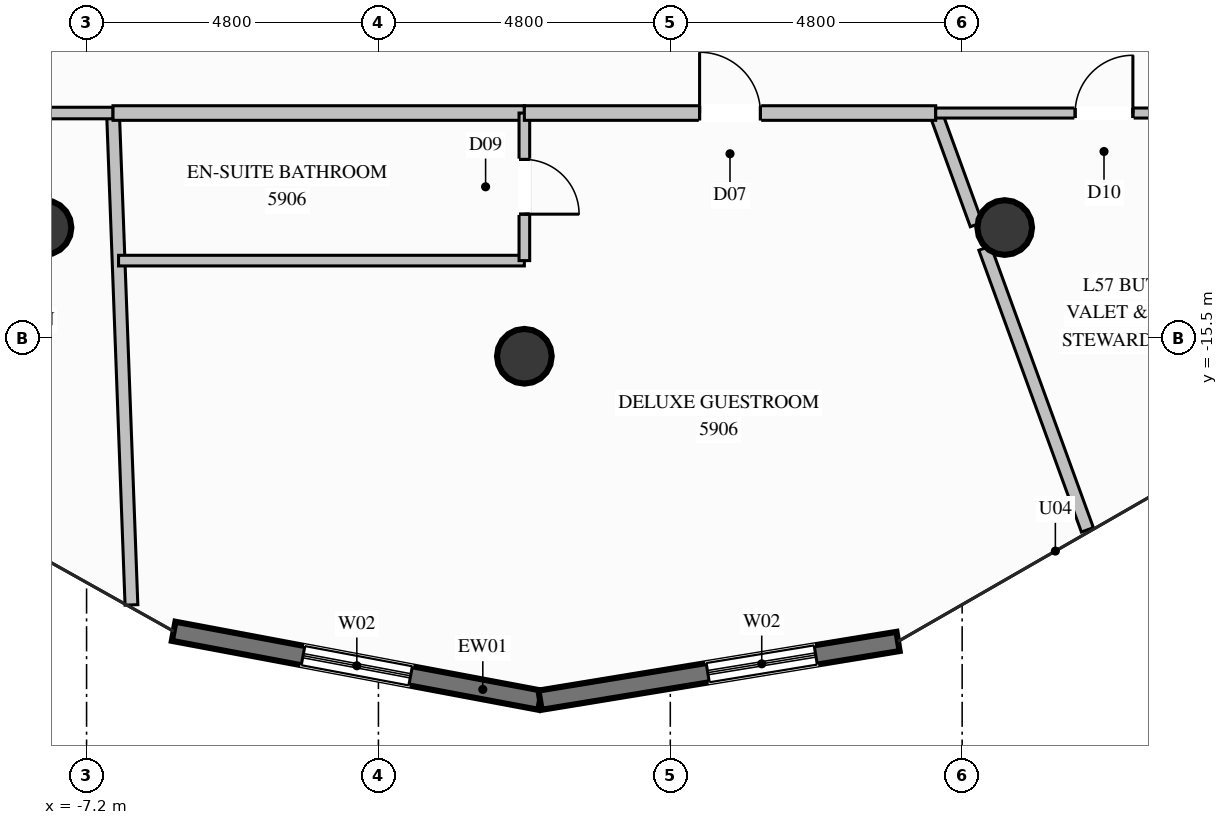
"""IFC4 building model, lengths in metres.
Left out: names, types, materials, properties, quantities, classifications, styles, units other than length and angle.
Written with IfcOpenShell. Run it as: python <this file> out.ifc"""

import sys

from ifc_helpers import new_model, si_unit, direction, frame, frame_2d, origin, origin_2d, place, context, subcontext, project, spatial, rectangle, circle, extrude, element, fill, save


model = new_model("IFC4")
c1 = context("Model", 3, precision=1e-05, world=origin(), true_north=direction((0.0, 1.0)))
c2 = subcontext(c1, "Body", "Model", "MODEL_VIEW")
j1 = project(units=[si_unit("LENGTHUNIT", "METRE"), si_unit("PLANEANGLEUNIT", "RADIAN")], contexts=[c1])
p1 = place(None, origin())
s1 = spatial("IfcSite", under=j1, at=p1, CompositionType="ELEMENT")
p2 = place(p1, origin())
s2 = spatial("IfcBuilding", under=s1, at=p2, CompositionType="ELEMENT")
p3 = place(p2, frame((0.0, 0.0, 220.0)))
s3 = spatial("IfcBuildingStorey", under=s2, at=p3, CompositionType="ELEMENT", Elevation=220.0)
for number, where, z_axis, x_axis in (
    (1, (-7.9, -13.683, 0.0), (0.0, 0.0, 1.0), (1.0, 0.0, 0.0)),
    (2, (0.0, -15.8, 0.0), (0.0, 0.0, 1.0), (1.0, 0.0, 0.0)),
    (3, (7.9, -13.683, 0.0), (0.0, 0.0, 1.0), (1.0, 0.0, 0.0)),
):
    element("IfcColumn", number, at=place(p3, frame(where, z_axis=z_axis, x_axis=x_axis)), inside=s3, PredefinedType="COLUMN", context=c2, shape_type="SweptSolid", body=[
        extrude(circle(Radius=0.45, at=origin_2d()), origin(), (0.0, 0.0, 1.0), 3.6),
    ])
p4 = place(p3, frame((0.258, -21.456, 0.0), z_axis=(0.0, 0.0, 1.0), x_axis=(-0.982778756256, 0.184786136523, 0.0)))
e4 = element("IfcWall", 4, at=p4, inside=s3, PredefinedType="SOLIDWALL", context=c2, shape_type="SweptSolid", body=[
    extrude(rectangle(XDim=6.132, YDim=0.32, at=frame_2d((3.066, 0.0))), origin(), (0.0, 0.0, 1.0), 3.36),
])
p5 = place(p4, frame((2.166, 0.0, 0.35)))
e5 = element("IfcOpeningElement", 5, at=p5, cuts=e4, PredefinedType="OPENING", context=c2, shape_type="SweptSolid", body=[
    extrude(rectangle(XDim=1.8, YDim=2.6, at=frame_2d((0.9, 1.3))), frame((0.0, 0.17, 0.0), z_axis=(0.0, -1.0, 0.0), x_axis=(1.0, 0.0, 0.0)), (0.0, 0.0, 1.0), 0.34),
])
p6 = place(p3, frame((6.146, -20.49, 0.0), z_axis=(0.0, 0.0, 1.0), x_axis=(-0.986805489114, -0.161910242585, 0.0)))
e6 = element("IfcWall", 6, at=p6, inside=s3, PredefinedType="SOLIDWALL", context=c2, shape_type="SweptSolid", body=[
    extrude(rectangle(XDim=5.967, YDim=0.32, at=frame_2d((2.983, 0.0))), origin(), (0.0, 0.0, 1.0), 3.36),
])
p7 = place(p6, frame((1.372, 0.0, 0.35)))
e7 = element("IfcOpeningElement", 7, at=p7, cuts=e6, PredefinedType="OPENING", context=c2, shape_type="SweptSolid", body=[
    extrude(rectangle(XDim=1.8, YDim=2.6, at=frame_2d((0.9, 1.3))), frame((0.0, 0.17, 0.0), z_axis=(0.0, -1.0, 0.0), x_axis=(1.0, 0.0, 0.0)), (0.0, 0.0, 1.0), 0.34),
])
p8 = place(p3, frame((-6.765, -11.8, 0.0), z_axis=(0.0, 0.0, 1.0), x_axis=(0.037429988299, -0.999299252464, 0.0)))
e8 = element("IfcWall", 8, at=p8, inside=s3, PredefinedType="PARTITIONING", context=c2, shape_type="SweptSolid", body=[
    extrude(rectangle(XDim=8.094, YDim=0.21, at=frame_2d((4.047, 0.0))), origin(), (0.0, 0.0, 1.0), 3.36),
])
p9 = place(p3, frame((-12.3, -11.8, 0.0), z_axis=(0.0, 0.0, 1.0), x_axis=(1.0, 0.0, 0.0)))
e9 = element("IfcWall", 9, at=p9, inside=s3, PredefinedType="PARTITIONING", context=c2, shape_type="SweptSolid", body=[
    extrude(rectangle(XDim=5.535, YDim=0.19, at=frame_2d((2.768, 0.0))), origin(), (0.0, 0.0, 1.0), 3.36),
])
p10 = place(p9, frame((2.293, 0.0, 0.0)))
e10 = element("IfcOpeningElement", 10, at=p10, cuts=e9, PredefinedType="OPENING", context=c2, shape_type="SweptSolid", body=[
    extrude(rectangle(XDim=0.95, YDim=2.1, at=frame_2d((0.475, 1.05))), frame((0.0, 0.105, 0.0), z_axis=(0.0, -1.0, 0.0), x_axis=(1.0, 0.0, 0.0)), (0.0, 0.0, 1.0), 0.21),
])
p11 = place(p3, frame((-6.765, -11.8, 0.0), z_axis=(0.0, 0.0, 1.0), x_axis=(1.0, 0.0, 0.0)))
e11 = element("IfcWall", 11, at=p11, inside=s3, PredefinedType="PARTITIONING", context=c2, shape_type="SweptSolid", body=[
    extrude(rectangle(XDim=6.765, YDim=0.24, at=frame_2d((3.382, 0.0))), origin(), (0.0, 0.0, 1.0), 3.36),
])
p12 = place(p3, frame((-6.674, -14.227, 0.0), z_axis=(0.0, 0.0, 1.0), x_axis=(1.0, 0.0, 0.0)))
e12 = element("IfcWall", 12, at=p12, inside=s3, PredefinedType="PLUMBINGWALL", context=c2, shape_type="SweptSolid", body=[
    extrude(rectangle(XDim=6.674, YDim=0.175, at=frame_2d((3.337, 0.0))), origin(), (0.0, 0.0, 1.0), 2.929),
])
p13 = place(p3, frame((0.0, -11.8, 0.0), z_axis=(0.0, 0.0, 1.0), x_axis=(0.0, -1.0, 0.0)))
e13 = element("IfcWall", 13, at=p13, inside=s3, PredefinedType="PLUMBINGWALL", context=c2, shape_type="SweptSolid", body=[
    extrude(rectangle(XDim=2.427, YDim=0.175, at=frame_2d((1.213, 0.0))), origin(), (0.0, 0.0, 1.0), 3.36),
])
p14 = place(p13, frame((0.763, 0.0, 0.0)))
e14 = element("IfcOpeningElement", 14, at=p14, cuts=e13, PredefinedType="OPENING", context=c2, shape_type="SweptSolid", body=[
    extrude(rectangle(XDim=0.9, YDim=2.1, at=frame_2d((0.45, 1.05))), frame((0.0, 0.098, 0.0), z_axis=(0.0, -1.0, 0.0), x_axis=(1.0, 0.0, 0.0)), (0.0, 0.0, 1.0), 0.195),
])
p15 = place(p3, frame((6.765, -11.8, 0.0), z_axis=(0.0, 0.0, 1.0), x_axis=(0.342335512807, -0.939577775743, 0.0)))
e15 = element("IfcWall", 15, at=p15, inside=s3, PredefinedType="PARTITIONING", context=c2, shape_type="SweptSolid", body=[
    extrude(rectangle(XDim=1.952, YDim=0.21, at=frame_2d((0.976, 0.0))), origin(), (0.0, 0.0, 1.0), 2.877),
])
p16 = place(p3, frame((7.573, -14.021, 0.0), z_axis=(0.0, 0.0, 1.0), x_axis=(0.342084883254, -0.939669054854, 0.0)))
e16 = element("IfcWall", 16, at=p16, inside=s3, PredefinedType="PARTITIONING", context=c2, shape_type="SweptSolid", body=[
    extrude(rectangle(XDim=4.932, YDim=0.21, at=frame_2d((2.466, 0.0))), origin(), (0.0, 0.0, 1.0), 3.36),
])
p17 = place(p3, frame((0.0, -11.8, 0.0), z_axis=(0.0, 0.0, 1.0), x_axis=(1.0, 0.0, 0.0)))
e17 = element("IfcWall", 17, at=p17, inside=s3, PredefinedType="PARTITIONING", context=c2, shape_type="SweptSolid", body=[
    extrude(rectangle(XDim=6.765, YDim=0.24, at=frame_2d((3.382, 0.0))), origin(), (0.0, 0.0, 1.0), 3.36),
])
p18 = place(p17, frame((2.882, 0.0, 0.0)))
e18 = element("IfcOpeningElement", 18, at=p18, cuts=e17, PredefinedType="OPENING", context=c2, shape_type="SweptSolid", body=[
    extrude(rectangle(XDim=1.0, YDim=2.2, at=frame_2d((0.5, 1.1))), frame((0.0, 0.13, 0.0), z_axis=(0.0, -1.0, 0.0), x_axis=(1.0, 0.0, 0.0)), (0.0, 0.0, 1.0), 0.26),
])
p19 = place(p3, frame((6.765, -11.8, 0.0), z_axis=(0.0, 0.0, 1.0), x_axis=(1.0, 0.0, 0.0)))
e19 = element("IfcWall", 19, at=p19, inside=s3, PredefinedType="PARTITIONING", context=c2, shape_type="SweptSolid", body=[
    extrude(rectangle(XDim=5.535, YDim=0.165, at=frame_2d((2.768, 0.0))), origin(), (0.0, 0.0, 1.0), 3.36),
])
p20 = place(p19, frame((2.293, 0.0, 0.0)))
e20 = element("IfcOpeningElement", 20, at=p20, cuts=e19, PredefinedType="OPENING", context=c2, shape_type="SweptSolid", body=[
    extrude(rectangle(XDim=0.95, YDim=2.1, at=frame_2d((0.475, 1.05))), frame((0.0, 0.093, 0.0), z_axis=(0.0, -1.0, 0.0), x_axis=(1.0, 0.0, 0.0)), (0.0, 0.0, 1.0), 0.185),
])
p21 = place(p5, origin())
e21 = element("IfcWindow", 21, at=p21, inside=s3, PartitioningType="SINGLE_PANEL", PredefinedType="WINDOW", context=c2, shape_type="SweptSolid", body=[
    extrude(rectangle(XDim=1.8, YDim=2.6, at=frame_2d((0.9, 1.3))), frame((0.0, 0.03, 0.0), z_axis=(0.0, -1.0, 0.0), x_axis=(1.0, 0.0, 0.0)), (0.0, 0.0, 1.0), 0.06),
])
fill(e5, e21)
p22 = place(p7, origin())
e22 = element("IfcWindow", 22, at=p22, inside=s3, PartitioningType="SINGLE_PANEL", PredefinedType="WINDOW", context=c2, shape_type="SweptSolid", body=[
    extrude(rectangle(XDim=1.8, YDim=2.6, at=frame_2d((0.9, 1.3))), frame((0.0, 0.03, 0.0), z_axis=(0.0, -1.0, 0.0), x_axis=(1.0, 0.0, 0.0)), (0.0, 0.0, 1.0), 0.06),
])
fill(e7, e22)
p23 = place(p14, origin())
e23 = element("IfcDoor", 23, at=p23, inside=s3, OperationType="SINGLE_SWING_RIGHT", PredefinedType="DOOR", context=c2, shape_type="SweptSolid", body=[
    extrude(rectangle(XDim=0.9, YDim=2.1, at=frame_2d((0.45, 1.05))), frame((0.0, 0.025, 0.0), z_axis=(0.0, -1.0, 0.0), x_axis=(1.0, 0.0, 0.0)), (0.0, 0.0, 1.0), 0.05),
])
fill(e14, e23)
p24 = place(p18, origin())
e24 = element("IfcDoor", 24, at=p24, inside=s3, OperationType="SINGLE_SWING_LEFT", PredefinedType="DOOR", context=c2, shape_type="SweptSolid", body=[
    extrude(rectangle(XDim=1.0, YDim=2.2, at=frame_2d((0.5, 1.1))), frame((0.0, 0.025, 0.0), z_axis=(0.0, -1.0, 0.0), x_axis=(1.0, 0.0, 0.0)), (0.0, 0.0, 1.0), 0.05),
])
fill(e18, e24)
p25 = place(p20, origin())
e25 = element("IfcDoor", 25, at=p25, inside=s3, OperationType="SINGLE_SWING_RIGHT", PredefinedType="DOOR", context=c2, shape_type="SweptSolid", body=[
    extrude(rectangle(XDim=0.95, YDim=2.1, at=frame_2d((0.475, 1.05))), frame((0.0, 0.025, 0.0), z_axis=(0.0, -1.0, 0.0), x_axis=(1.0, 0.0, 0.0)), (0.0, 0.0, 1.0), 0.05),
])
fill(e20, e25)
save(model, sys.argv[1])
